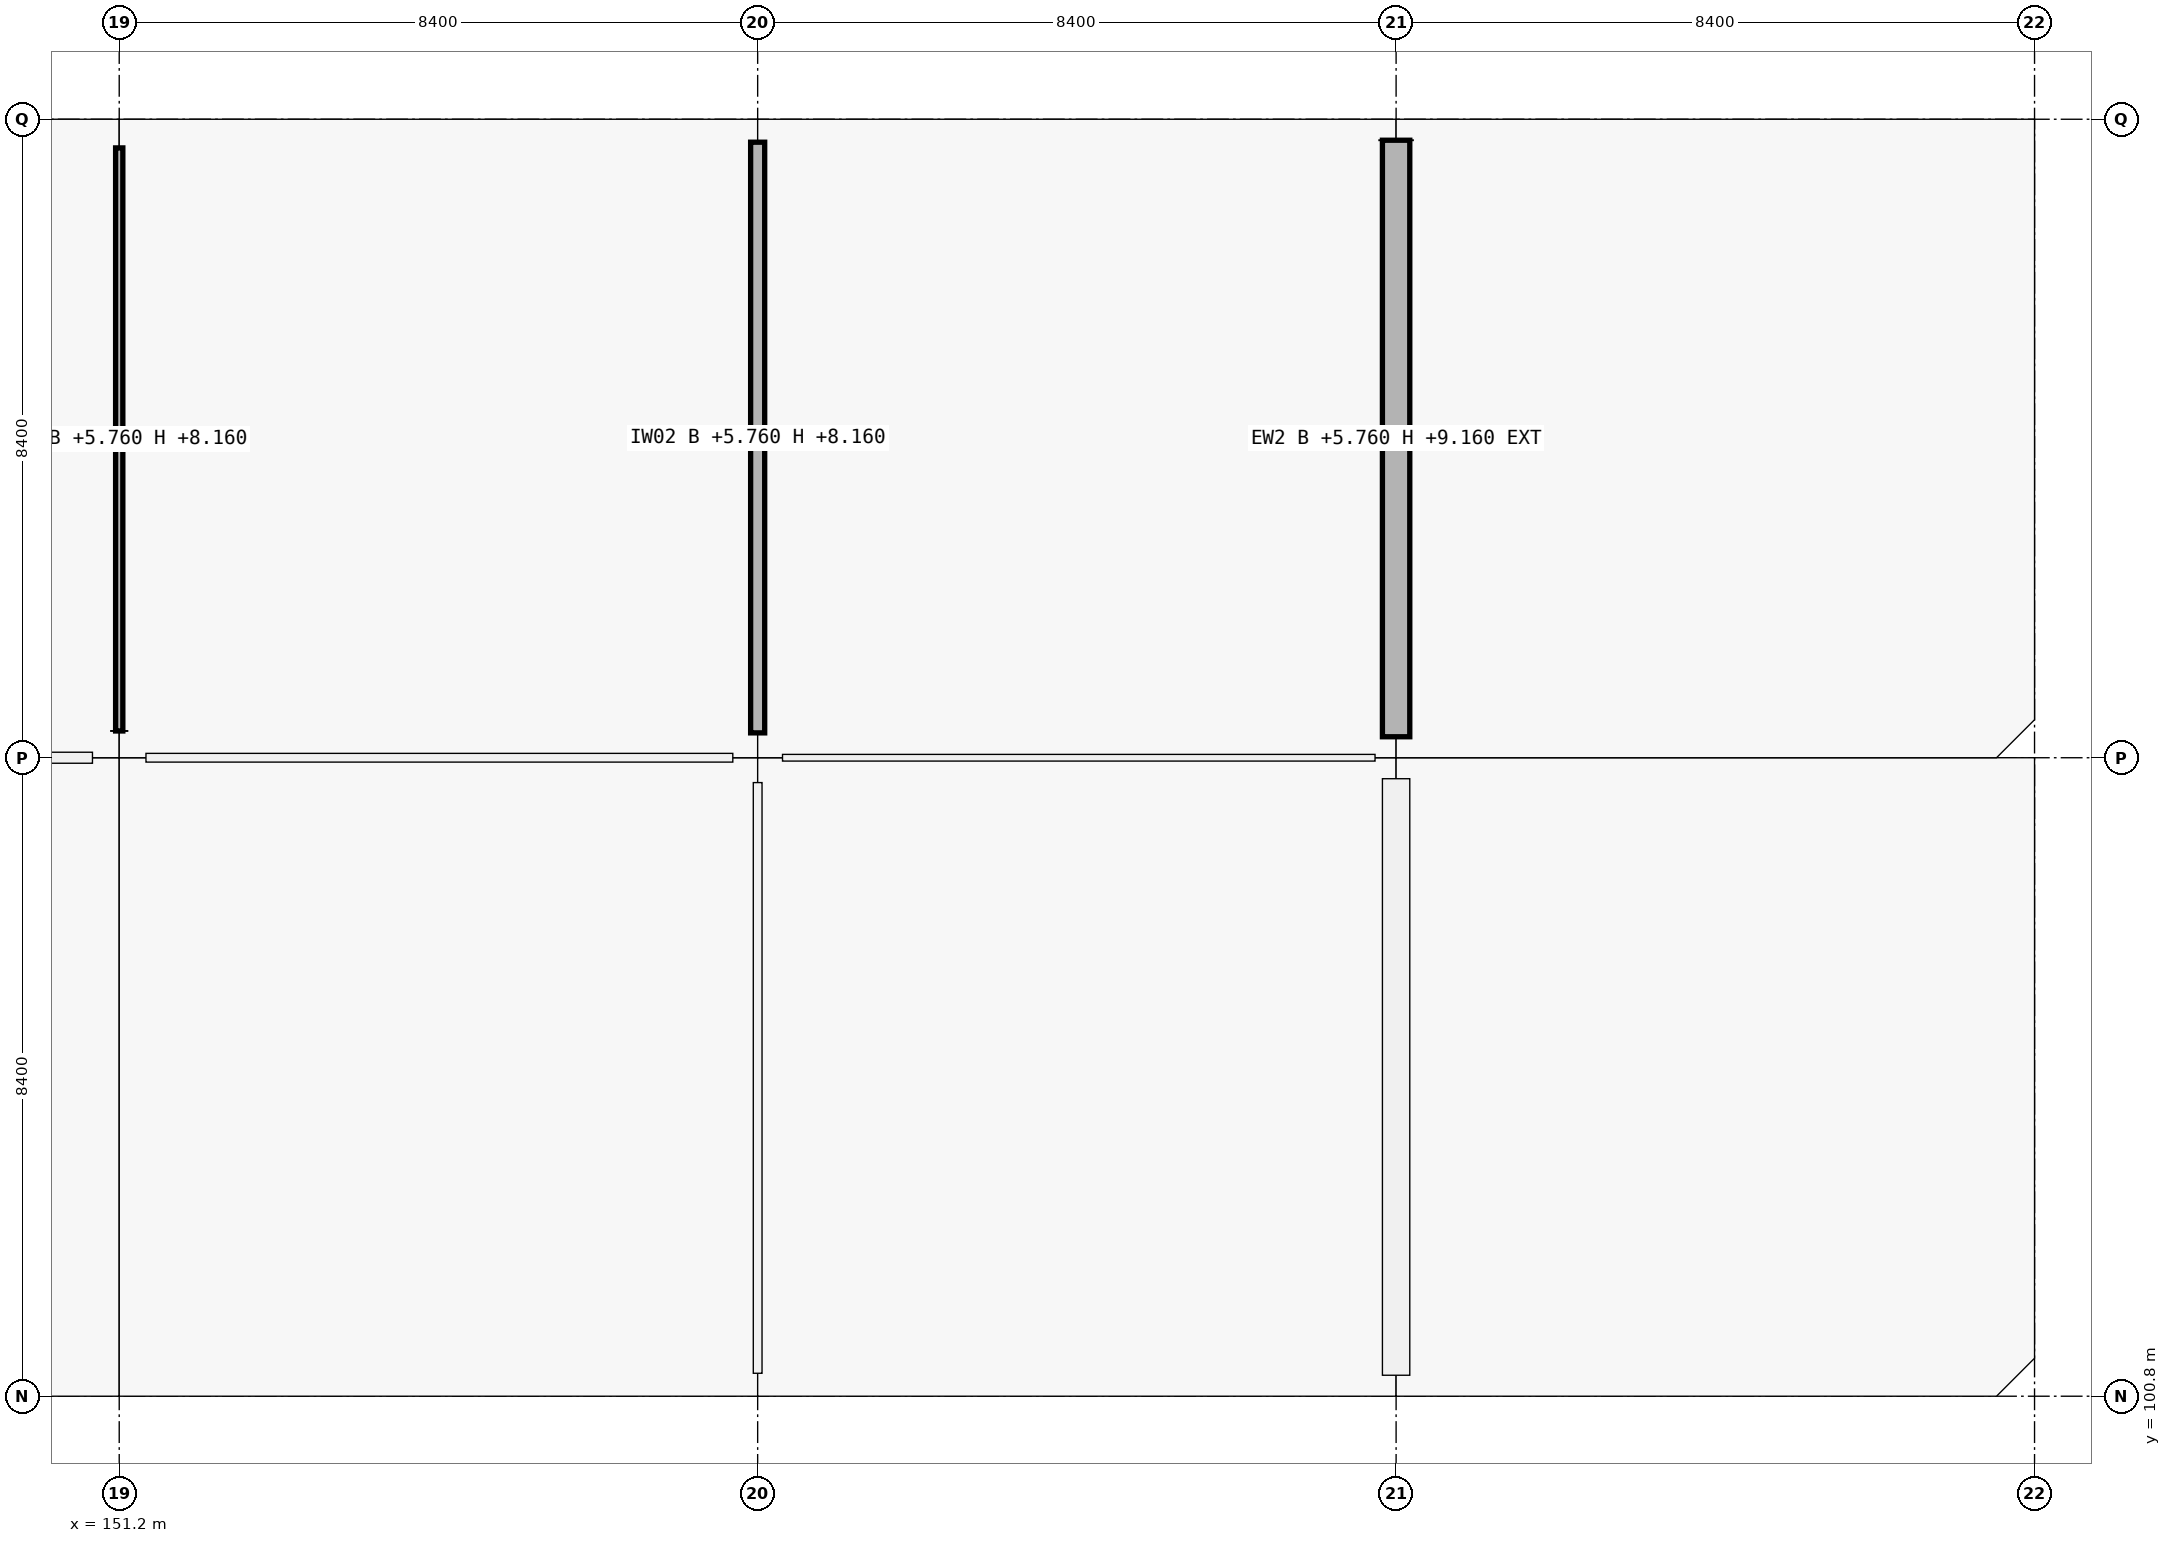
"""IFC4 building model, lengths in metres.
Left out: names, types, materials, properties, quantities, classifications, styles, units other than length and angle.
Written with IfcOpenShell. Run it as: python <this file> out.ifc"""

import sys

from ifc_helpers import new_model, si_unit, direction, frame, frame_2d, origin, origin_2d, place, context, subcontext, project, spatial, rectangle, extrude, element, fill, save


model = new_model("IFC4")
c1 = context("Model", 3, precision=1e-05, world=origin(), true_north=direction((0.0, 1.0)))
c2 = subcontext(c1, "Body", "Model", "MODEL_VIEW")
j1 = project(units=[si_unit("LENGTHUNIT", "METRE"), si_unit("PLANEANGLEUNIT", "RADIAN")], contexts=[c1])
p1 = place(None, origin())
s1 = spatial("IfcSite", under=j1, at=p1, CompositionType="ELEMENT")
p2 = place(p1, origin())
s2 = spatial("IfcBuilding", under=s1, at=p2, CompositionType="ELEMENT")
p3 = place(p2, frame((0.0, 0.0, 5.76)))
s3 = spatial("IfcBuildingStorey", under=s2, at=p3, CompositionType="ELEMENT", Elevation=5.76)
p4 = place(p3, frame((151.2, 100.8, 0.0), z_axis=(0.0, 0.0, 1.0), x_axis=(1.0, 0.0, 0.0)))
e1 = element("IfcColumn", 1, at=p4, inside=s3, PredefinedType="COLUMN", context=c2, shape_type="SweptSolid", body=[
    extrude(rectangle(XDim=0.75, YDim=0.75, at=origin_2d()), origin(), (0.0, 0.0, 1.0), 4.5),
])
p5 = place(p3, frame((151.2, 109.2, 0.0), z_axis=(0.0, 0.0, 1.0), x_axis=(1.0, 0.0, 0.0)))
e2 = element("IfcColumn", 2, at=p5, inside=s3, PredefinedType="COLUMN", context=c2, shape_type="SweptSolid", body=[
    extrude(rectangle(XDim=0.7, YDim=0.7, at=origin_2d()), origin(), (0.0, 0.0, 1.0), 4.5),
])
p6 = place(p3, frame((151.2, 117.6, 0.0), z_axis=(0.0, 0.0, 1.0), x_axis=(1.0, 0.0, 0.0)))
e3 = element("IfcColumn", 3, at=p6, inside=s3, PredefinedType="COLUMN", context=c2, shape_type="SweptSolid", body=[
    extrude(rectangle(XDim=0.75, YDim=0.75, at=origin_2d()), origin(), (0.0, 0.0, 1.0), 4.5),
])
p7 = place(p3, frame((159.6, 100.8, 0.0), z_axis=(0.0, 0.0, 1.0), x_axis=(1.0, 0.0, 0.0)))
e4 = element("IfcColumn", 4, at=p7, inside=s3, PredefinedType="COLUMN", context=c2, shape_type="SweptSolid", body=[
    extrude(rectangle(XDim=0.6, YDim=0.6, at=origin_2d()), origin(), (0.0, 0.0, 1.0), 4.5),
])
p8 = place(p3, frame((159.6, 109.2, 0.0), z_axis=(0.0, 0.0, 1.0), x_axis=(1.0, 0.0, 0.0)))
e5 = element("IfcColumn", 5, at=p8, inside=s3, PredefinedType="COLUMN", context=c2, shape_type="SweptSolid", body=[
    extrude(rectangle(XDim=0.65, YDim=0.65, at=origin_2d()), origin(), (0.0, 0.0, 1.0), 4.5),
])
p9 = place(p3, frame((159.6, 117.6, 0.0), z_axis=(0.0, 0.0, 1.0), x_axis=(1.0, 0.0, 0.0)))
e6 = element("IfcColumn", 6, at=p9, inside=s3, PredefinedType="COLUMN", context=c2, shape_type="SweptSolid", body=[
    extrude(rectangle(XDim=0.6, YDim=0.6, at=origin_2d()), origin(), (0.0, 0.0, 1.0), 4.5),
])
for number, where, z_axis, x_axis in (
    (7, (168.0, 100.8, 0.0), (0.0, 0.0, 1.0), (1.0, 0.0, 0.0)),
    (8, (168.0, 109.2, 0.0), (0.0, 0.0, 1.0), (1.0, 0.0, 0.0)),
    (9, (168.0, 117.6, 0.0), (0.0, 0.0, 1.0), (1.0, 0.0, 0.0)),
):
    element("IfcColumn", number, at=place(p3, frame(where, z_axis=z_axis, x_axis=x_axis)), inside=s3, PredefinedType="COLUMN", context=c2, shape_type="SweptSolid", body=[
        extrude(rectangle(XDim=0.55, YDim=0.55, at=origin_2d()), origin(), (0.0, 0.0, 1.0), 4.2),
    ])
p10 = place(p3, frame((168.0, 108.924, 0.0), z_axis=(0.0, 0.0, 1.0), x_axis=(0.0, -1.0, 0.0)))
e10 = element("IfcWall", 10, at=p10, inside=s3, PredefinedType="SOLIDWALL", context=c2, shape_type="SweptSolid", body=[
    extrude(rectangle(XDim=7.848, YDim=0.36, at=frame_2d((3.924, 0.0))), origin(), (0.0, 0.0, 1.0), 3.4),
])
p11 = place(p10, frame((3.099, 0.0, 0.0)))
e11 = element("IfcOpeningElement", 11, at=p11, cuts=e10, PredefinedType="OPENING", context=c2, shape_type="SweptSolid", body=[
    extrude(rectangle(XDim=1.65, YDim=2.2, at=frame_2d((0.825, 1.1))), frame((0.0, 0.18, 0.0), z_axis=(0.0, -1.0, 0.0), x_axis=(1.0, 0.0, 0.0)), (0.0, 0.0, 1.0), 0.36),
])
p12 = place(p3, frame((168.0, 117.324, 0.0), z_axis=(0.0, 0.0, 1.0), x_axis=(0.0, -1.0, 0.0)))
e12 = element("IfcWall", 12, at=p12, inside=s3, PredefinedType="SOLIDWALL", context=c2, shape_type="SweptSolid", body=[
    extrude(rectangle(XDim=7.848, YDim=0.36, at=frame_2d((3.924, 0.0))), origin(), (0.0, 0.0, 1.0), 3.4),
])
p13 = place(p12, frame((3.364, 0.0, 0.0)))
e13 = element("IfcOpeningElement", 13, at=p13, cuts=e12, PredefinedType="OPENING", context=c2, shape_type="SweptSolid", body=[
    extrude(rectangle(XDim=1.12, YDim=2.2, at=frame_2d((0.56, 1.1))), frame((0.0, 0.18, 0.0), z_axis=(0.0, -1.0, 0.0), x_axis=(1.0, 0.0, 0.0)), (0.0, 0.0, 1.0), 0.36),
])
p14 = place(p3, frame((143.177, 109.2, 0.0), z_axis=(0.0, 0.0, 1.0), x_axis=(1.0, 0.0, 0.0)))
e14 = element("IfcWall", 14, at=p14, inside=s3, PredefinedType="PARTITIONING", context=c2, shape_type="SweptSolid", body=[
    extrude(rectangle(XDim=7.671, YDim=0.145, at=frame_2d((3.835, 0.0))), origin(), (0.0, 0.0, 1.0), 2.4),
])
p15 = place(p14, frame((3.376, 0.0, 0.0)))
e15 = element("IfcOpeningElement", 15, at=p15, cuts=e14, PredefinedType="OPENING", context=c2, shape_type="SweptSolid", body=[
    extrude(rectangle(XDim=0.92, YDim=2.15, at=frame_2d((0.46, 1.075))), frame((0.0, 0.073, 0.0), z_axis=(0.0, -1.0, 0.0), x_axis=(1.0, 0.0, 0.0)), (0.0, 0.0, 1.0), 0.145),
])
p16 = place(p3, frame((151.552, 109.2, 0.0), z_axis=(0.0, 0.0, 1.0), x_axis=(1.0, 0.0, 0.0)))
e16 = element("IfcWall", 16, at=p16, inside=s3, PredefinedType="PARTITIONING", context=c2, shape_type="SweptSolid", body=[
    extrude(rectangle(XDim=7.721, YDim=0.115, at=frame_2d((3.86, 0.0))), origin(), (0.0, 0.0, 1.0), 2.4),
])
p17 = place(p16, frame((3.336, 0.0, 0.0)))
e17 = element("IfcOpeningElement", 17, at=p17, cuts=e16, PredefinedType="OPENING", context=c2, shape_type="SweptSolid", body=[
    extrude(rectangle(XDim=1.05, YDim=2.12, at=frame_2d((0.525, 1.06))), frame((0.0, 0.058, 0.0), z_axis=(0.0, -1.0, 0.0), x_axis=(1.0, 0.0, 0.0)), (0.0, 0.0, 1.0), 0.115),
])
p18 = place(p3, frame((159.927, 109.2, 0.0), z_axis=(0.0, 0.0, 1.0), x_axis=(1.0, 0.0, 0.0)))
e18 = element("IfcWall", 18, at=p18, inside=s3, PredefinedType="PARTITIONING", context=c2, shape_type="SweptSolid", body=[
    extrude(rectangle(XDim=7.796, YDim=0.088, at=frame_2d((3.898, 0.0))), origin(), (0.0, 0.0, 1.0), 2.4),
])
p19 = place(p18, frame((3.433, 0.0, 0.0)))
e19 = element("IfcOpeningElement", 19, at=p19, cuts=e18, PredefinedType="OPENING", context=c2, shape_type="SweptSolid", body=[
    extrude(rectangle(XDim=0.93, YDim=2.12, at=frame_2d((0.465, 1.06))), frame((0.0, 0.044, 0.0), z_axis=(0.0, -1.0, 0.0), x_axis=(1.0, 0.0, 0.0)), (0.0, 0.0, 1.0), 0.088),
])
p20 = place(p3, frame((151.2, 109.552, 0.0), z_axis=(0.0, 0.0, 1.0), x_axis=(0.0, 1.0, 0.0)))
e20 = element("IfcWall", 20, at=p20, inside=s3, PredefinedType="PARTITIONING", context=c2, shape_type="SweptSolid", body=[
    extrude(rectangle(XDim=7.671, YDim=0.095, at=frame_2d((3.835, 0.0))), origin(), (0.0, 0.0, 1.0), 2.4),
])
p21 = place(p20, frame((3.371, 0.0, 0.0)))
e21 = element("IfcOpeningElement", 21, at=p21, cuts=e20, PredefinedType="OPENING", context=c2, shape_type="SweptSolid", body=[
    extrude(rectangle(XDim=0.93, YDim=2.12, at=frame_2d((0.465, 1.06))), frame((0.0, 0.047, 0.0), z_axis=(0.0, -1.0, 0.0), x_axis=(1.0, 0.0, 0.0)), (0.0, 0.0, 1.0), 0.095),
])
p22 = place(p3, frame((159.6, 101.102, 0.0), z_axis=(0.0, 0.0, 1.0), x_axis=(0.0, 1.0, 0.0)))
e22 = element("IfcWall", 22, at=p22, inside=s3, PredefinedType="PARTITIONING", context=c2, shape_type="SweptSolid", body=[
    extrude(rectangle(XDim=7.771, YDim=0.115, at=frame_2d((3.885, 0.0))), origin(), (0.0, 0.0, 1.0), 2.4),
])
p23 = place(p22, frame((3.381, 0.0, 0.0)))
e23 = element("IfcOpeningElement", 23, at=p23, cuts=e22, PredefinedType="OPENING", context=c2, shape_type="SweptSolid", body=[
    extrude(rectangle(XDim=1.01, YDim=2.12, at=frame_2d((0.505, 1.06))), frame((0.0, 0.058, 0.0), z_axis=(0.0, -1.0, 0.0), x_axis=(1.0, 0.0, 0.0)), (0.0, 0.0, 1.0), 0.115),
])
p24 = place(p3, frame((159.6, 109.527, 0.0), z_axis=(0.0, 0.0, 1.0), x_axis=(0.0, 1.0, 0.0)))
e24 = element("IfcWall", 24, at=p24, inside=s3, PredefinedType="PARTITIONING", context=c2, shape_type="SweptSolid", body=[
    extrude(rectangle(XDim=7.771, YDim=0.185, at=frame_2d((3.885, 0.0))), origin(), (0.0, 0.0, 1.0), 2.4),
])
p25 = place(p24, frame((3.375, 0.0, 0.0)))
e25 = element("IfcOpeningElement", 25, at=p25, cuts=e24, PredefinedType="OPENING", context=c2, shape_type="SweptSolid", body=[
    extrude(rectangle(XDim=1.02, YDim=2.2, at=frame_2d((0.51, 1.1))), frame((0.0, 0.093, 0.0), z_axis=(0.0, -1.0, 0.0), x_axis=(1.0, 0.0, 0.0)), (0.0, 0.0, 1.0), 0.185),
])
p26 = place(p11, origin())
e26 = element("IfcDoor", 26, at=p26, inside=s3, OperationType="DOUBLE_DOOR_SINGLE_SWING", PredefinedType="DOOR", context=c2, shape_type="SweptSolid", body=[
    extrude(rectangle(XDim=1.65, YDim=2.2, at=frame_2d((0.825, 1.1))), frame((0.0, 0.025, 0.0), z_axis=(0.0, -1.0, 0.0), x_axis=(1.0, 0.0, 0.0)), (0.0, 0.0, 1.0), 0.05),
])
fill(e11, e26)
p27 = place(p13, origin())
e27 = element("IfcDoor", 27, at=p27, inside=s3, OperationType="SINGLE_SWING_LEFT", PredefinedType="DOOR", context=c2, shape_type="SweptSolid", body=[
    extrude(rectangle(XDim=1.12, YDim=2.2, at=frame_2d((0.56, 1.1))), frame((0.0, 0.025, 0.0), z_axis=(0.0, -1.0, 0.0), x_axis=(1.0, 0.0, 0.0)), (0.0, 0.0, 1.0), 0.05),
])
fill(e13, e27)
p28 = place(p17, origin())
e28 = element("IfcDoor", 28, at=p28, inside=s3, OperationType="SINGLE_SWING_RIGHT", PredefinedType="DOOR", context=c2, shape_type="SweptSolid", body=[
    extrude(rectangle(XDim=1.05, YDim=2.12, at=frame_2d((0.525, 1.06))), frame((0.0, 0.025, 0.0), z_axis=(0.0, -1.0, 0.0), x_axis=(1.0, 0.0, 0.0)), (0.0, 0.0, 1.0), 0.05),
])
fill(e17, e28)
p29 = place(p23, origin())
e29 = element("IfcDoor", 29, at=p29, inside=s3, OperationType="SINGLE_SWING_RIGHT", PredefinedType="DOOR", context=c2, shape_type="SweptSolid", body=[
    extrude(rectangle(XDim=1.01, YDim=2.12, at=frame_2d((0.505, 1.06))), frame((0.0, 0.025, 0.0), z_axis=(0.0, -1.0, 0.0), x_axis=(1.0, 0.0, 0.0)), (0.0, 0.0, 1.0), 0.05),
])
fill(e23, e29)
p30 = place(p19, origin())
e30 = element("IfcDoor", 30, at=p30, inside=s3, OperationType="SINGLE_SWING_RIGHT", PredefinedType="DOOR", context=c2, shape_type="SweptSolid", body=[
    extrude(rectangle(XDim=0.93, YDim=2.12, at=frame_2d((0.465, 1.06))), frame((0.0, 0.025, 0.0), z_axis=(0.0, -1.0, 0.0), x_axis=(1.0, 0.0, 0.0)), (0.0, 0.0, 1.0), 0.05),
])
fill(e19, e30)
p31 = place(p21, origin())
e31 = element("IfcDoor", 31, at=p31, inside=s3, OperationType="SINGLE_SWING_RIGHT", PredefinedType="DOOR", context=c2, shape_type="SweptSolid", body=[
    extrude(rectangle(XDim=0.93, YDim=2.12, at=frame_2d((0.465, 1.06))), frame((0.0, 0.025, 0.0), z_axis=(0.0, -1.0, 0.0), x_axis=(1.0, 0.0, 0.0)), (0.0, 0.0, 1.0), 0.05),
])
fill(e21, e31)
p32 = place(p25, origin())
e32 = element("IfcDoor", 32, at=p32, inside=s3, OperationType="SINGLE_SWING_RIGHT", PredefinedType="DOOR", context=c2, shape_type="SweptSolid", body=[
    extrude(rectangle(XDim=1.02, YDim=2.2, at=frame_2d((0.51, 1.1))), frame((0.0, 0.025, 0.0), z_axis=(0.0, -1.0, 0.0), x_axis=(1.0, 0.0, 0.0)), (0.0, 0.0, 1.0), 0.05),
])
fill(e25, e32)
save(model, sys.argv[1])
